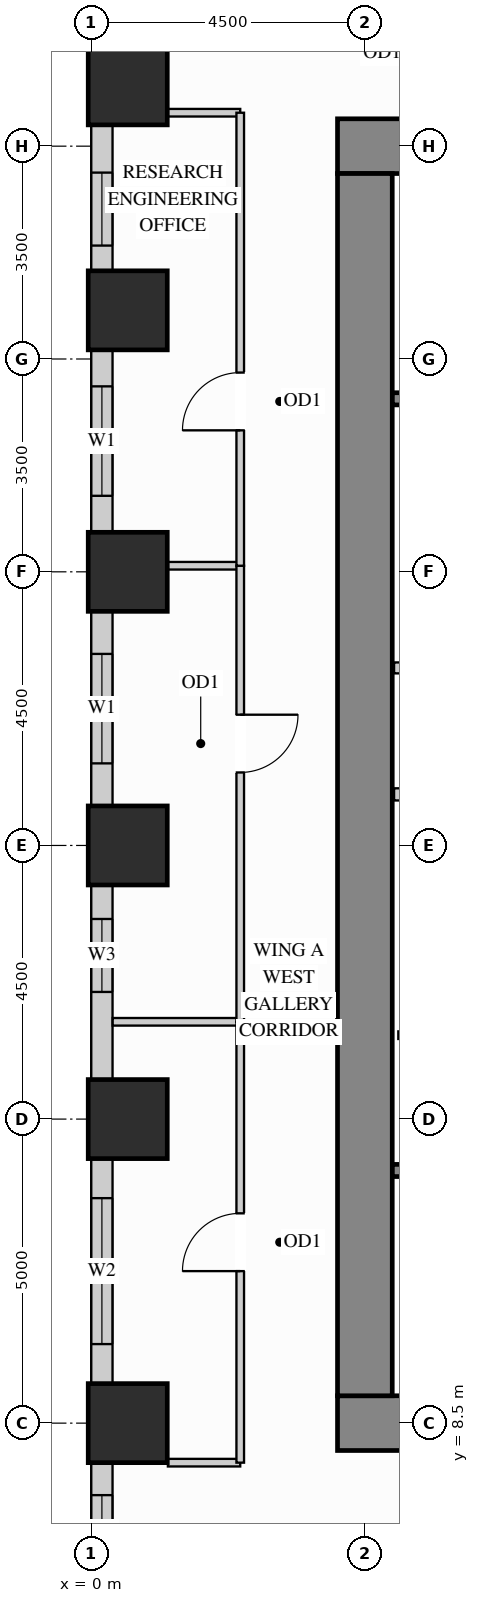
"""IFC4 building model, lengths in metres.
Left out: names, types, materials, properties, quantities, classifications, styles, units other than length and angle.
Written with IfcOpenShell. Run it as: python <this file> out.ifc"""

import sys

from ifc_helpers import new_model, si_unit, direction, frame, frame_2d, origin, origin_2d, place, context, subcontext, project, spatial, rectangle, extrude, source, transform, mapped, element, fill, save


model = new_model("IFC4")
c1 = context("Model", 3, precision=1e-05, world=origin(), true_north=direction((0.0, 1.0)))
c2 = subcontext(c1, "Body", "Model", "MODEL_VIEW")
j1 = project(units=[si_unit("LENGTHUNIT", "METRE"), si_unit("PLANEANGLEUNIT", "RADIAN")], contexts=[c1])
p1 = place(None, origin())
s1 = spatial("IfcSite", under=j1, at=p1, CompositionType="ELEMENT")
p2 = place(p1, origin())
s2 = spatial("IfcBuilding", under=s1, at=p2, CompositionType="ELEMENT")
p3 = place(p2, frame((0.0, 0.0, 36.9)))
s3 = spatial("IfcBuildingStorey", under=s2, at=p3, CompositionType="ELEMENT", Elevation=36.9)
m1 = source(origin(), c2, "Body", "SweptSolid", [
    extrude(rectangle(XDim=1.3, YDim=1.3, at=origin_2d()), origin(), (0.0, 0.0, 1.0), 3.38),
])
for number, where, z_axis, x_axis in (
    (1, (0.6, 13.5, 0.0), (0.0, 0.0, 1.0), (1.0, 0.0, 0.0)),
    (2, (0.6, 18.0, 0.0), (0.0, 0.0, 1.0), (1.0, 0.0, 0.0)),
    (3, (0.6, 22.5, 0.0), (0.0, 0.0, 1.0), (1.0, 0.0, 0.0)),
    (4, (0.6, 26.8, 0.0), (0.0, 0.0, 1.0), (1.0, 0.0, 0.0)),
    (5, (0.6, 30.5, 0.0), (0.0, 0.0, 1.0), (1.0, 0.0, 0.0)),
    (6, (0.6, 8.5, 0.0), (0.0, 0.0, 1.0), (1.0, 0.0, 0.0)),
):
    element("IfcColumn", number, at=place(p3, frame(where, z_axis=z_axis, x_axis=x_axis)), inside=s3, PredefinedType="COLUMN", context=c2, shape_type="MappedRepresentation", body=[
        mapped(m1, transform((0.0, 0.0, 0.0), x_axis=(1.0, 0.0, 0.0), y_axis=(0.0, 1.0, 0.0), z_axis=(0.0, 0.0, 1.0))),
    ])
m2 = source(origin(), c2, "Body", "SweptSolid", [
    extrude(rectangle(XDim=10.9, YDim=0.9, at=frame_2d((5.45, 0.0))), origin(), (0.0, 0.0, 1.0), 3.38),
])
for number, where, z_axis, x_axis in (
    (7, (4.05, 29.5, 0.0), (0.0, 0.0, 1.0), (1.0, 0.0, 0.0)),
    (8, (4.05, 8.5, 0.0), (0.0, 0.0, 1.0), (1.0, 0.0, 0.0)),
):
    element("IfcWall", number, at=place(p3, frame(where, z_axis=z_axis, x_axis=x_axis)), inside=s3, PredefinedType="SHEAR", context=c2, shape_type="MappedRepresentation", body=[
        mapped(m2, transform((0.0, 0.0, 0.0), x_axis=(1.0, 0.0, 0.0), y_axis=(0.0, 1.0, 0.0), z_axis=(0.0, 0.0, 1.0))),
    ])
m3 = source(origin(), c2, "Body", "SweptSolid", [
    extrude(rectangle(XDim=20.1, YDim=0.9, at=frame_2d((10.05, 0.0))), origin(), (0.0, 0.0, 1.0), 3.38),
])
p4 = place(p3, frame((4.5, 8.95, 0.0), z_axis=(0.0, 0.0, 1.0), x_axis=(0.0, 1.0, 0.0)))
e9 = element("IfcWall", 9, at=p4, inside=s3, PredefinedType="SHEAR", context=c2, shape_type="MappedRepresentation", body=[
    mapped(m3, transform((0.0, 0.0, 0.0), x_axis=(1.0, 0.0, 0.0), y_axis=(0.0, 1.0, 0.0), z_axis=(0.0, 0.0, 1.0))),
])
p5 = place(p3, frame((0.175, 29.852, 0.0), z_axis=(0.0, 0.0, 1.0), x_axis=(0.0, -1.0, 0.0)))
e10 = element("IfcWall", 10, at=p5, inside=s3, PredefinedType="SOLIDWALL", context=c2, shape_type="SweptSolid", body=[
    extrude(rectangle(XDim=2.404, YDim=0.35, at=frame_2d((1.202, 0.0))), origin(), (0.0, 0.0, 1.0), 2.51),
])
p6 = place(p5, frame((0.787, 0.0, 0.78)))
e11 = element("IfcOpeningElement", 11, at=p6, cuts=e10, PredefinedType="OPENING", context=c2, shape_type="SweptSolid", body=[
    extrude(rectangle(XDim=1.2, YDim=1.55, at=frame_2d((0.6, 0.775))), frame((0.0, 0.185, 0.0), z_axis=(0.0, -1.0, 0.0), x_axis=(1.0, 0.0, 0.0)), (0.0, 0.0, 1.0), 0.37),
])
p7 = place(p3, frame((0.175, 26.152, 0.0), z_axis=(0.0, 0.0, 1.0), x_axis=(0.0, -1.0, 0.0)))
e12 = element("IfcWall", 12, at=p7, inside=s3, PredefinedType="SOLIDWALL", context=c2, shape_type="SweptSolid", body=[
    extrude(rectangle(XDim=3.004, YDim=0.35, at=frame_2d((1.502, 0.0))), origin(), (0.0, 0.0, 1.0), 2.51),
])
p8 = place(p7, frame((0.602, 0.0, 0.78)))
e13 = element("IfcOpeningElement", 13, at=p8, cuts=e12, PredefinedType="OPENING", context=c2, shape_type="SweptSolid", body=[
    extrude(rectangle(XDim=1.8, YDim=1.55, at=frame_2d((0.9, 0.775))), frame((0.0, 0.185, 0.0), z_axis=(0.0, -1.0, 0.0), x_axis=(1.0, 0.0, 0.0)), (0.0, 0.0, 1.0), 0.37),
])
p9 = place(p3, frame((0.175, 21.852, 0.0), z_axis=(0.0, 0.0, 1.0), x_axis=(0.0, -1.0, 0.0)))
e14 = element("IfcWall", 14, at=p9, inside=s3, PredefinedType="SOLIDWALL", context=c2, shape_type="SweptSolid", body=[
    extrude(rectangle(XDim=3.204, YDim=0.35, at=frame_2d((1.602, 0.0))), origin(), (0.0, 0.0, 1.0), 2.51),
])
p10 = place(p9, frame((0.702, 0.0, 0.78)))
e15 = element("IfcOpeningElement", 15, at=p10, cuts=e14, PredefinedType="OPENING", context=c2, shape_type="SweptSolid", body=[
    extrude(rectangle(XDim=1.8, YDim=1.55, at=frame_2d((0.9, 0.775))), frame((0.0, 0.185, 0.0), z_axis=(0.0, -1.0, 0.0), x_axis=(1.0, 0.0, 0.0)), (0.0, 0.0, 1.0), 0.37),
])
p11 = place(p3, frame((0.175, 17.352, 0.0), z_axis=(0.0, 0.0, 1.0), x_axis=(0.0, -1.0, 0.0)))
e16 = element("IfcWall", 16, at=p11, inside=s3, PredefinedType="SOLIDWALL", context=c2, shape_type="SweptSolid", body=[
    extrude(rectangle(XDim=3.204, YDim=0.35, at=frame_2d((1.602, 0.0))), origin(), (0.0, 0.0, 1.0), 2.51),
])
p12 = place(p11, frame((0.561, 0.0, 0.78)))
e17 = element("IfcOpeningElement", 17, at=p12, cuts=e16, PredefinedType="OPENING", context=c2, shape_type="SweptSolid", body=[
    extrude(rectangle(XDim=1.2, YDim=1.55, at=frame_2d((0.6, 0.775))), frame((0.0, 0.185, 0.0), z_axis=(0.0, -1.0, 0.0), x_axis=(1.0, 0.0, 0.0)), (0.0, 0.0, 1.0), 0.37),
])
p13 = place(p3, frame((0.175, 12.852, 0.0), z_axis=(0.0, 0.0, 1.0), x_axis=(0.0, -1.0, 0.0)))
e18 = element("IfcWall", 18, at=p13, inside=s3, PredefinedType="SOLIDWALL", context=c2, shape_type="SweptSolid", body=[
    extrude(rectangle(XDim=3.704, YDim=0.35, at=frame_2d((1.852, 0.0))), origin(), (0.0, 0.0, 1.0), 2.51),
])
p14 = place(p13, frame((0.652, 0.0, 0.78)))
e19 = element("IfcOpeningElement", 19, at=p14, cuts=e18, PredefinedType="OPENING", context=c2, shape_type="SweptSolid", body=[
    extrude(rectangle(XDim=2.4, YDim=1.55, at=frame_2d((1.2, 0.775))), frame((0.0, 0.185, 0.0), z_axis=(0.0, -1.0, 0.0), x_axis=(1.0, 0.0, 0.0)), (0.0, 0.0, 1.0), 0.37),
])
p15 = place(p3, frame((0.175, 7.852, 0.0), z_axis=(0.0, 0.0, 1.0), x_axis=(0.0, -1.0, 0.0)))
e20 = element("IfcWall", 20, at=p15, inside=s3, PredefinedType="SOLIDWALL", context=c2, shape_type="SweptSolid", body=[
    extrude(rectangle(XDim=3.704, YDim=0.35, at=frame_2d((1.852, 0.0))), origin(), (0.0, 0.0, 1.0), 2.51),
])
p16 = place(p15, frame((0.536, 0.0, 0.78)))
e21 = element("IfcOpeningElement", 21, at=p16, cuts=e20, PredefinedType="OPENING", context=c2, shape_type="SweptSolid", body=[
    extrude(rectangle(XDim=1.2, YDim=1.55, at=frame_2d((0.6, 0.775))), frame((0.0, 0.185, 0.0), z_axis=(0.0, -1.0, 0.0), x_axis=(1.0, 0.0, 0.0)), (0.0, 0.0, 1.0), 0.37),
])
m4 = source(origin(), c2, "Body", "SweptSolid", [
    extrude(rectangle(XDim=2.17, YDim=0.18, at=frame_2d((1.085, 0.0))), origin(), (0.0, 0.0, 1.0), 3.365),
])
p17 = place(p3, frame((4.98, 20.92, 0.0), z_axis=(0.0, 0.0, 1.0), x_axis=(1.0, 0.0, 0.0)))
e22 = element("IfcWall", 22, at=p17, inside=s3, PredefinedType="PARTITIONING", context=c2, shape_type="MappedRepresentation", body=[
    mapped(m4, transform((0.0, 0.0, 0.0), x_axis=(1.0, 0.0, 0.0), y_axis=(0.0, 1.0, 0.0), z_axis=(0.0, 0.0, 1.0))),
])
p18 = place(p3, frame((5.05, 14.88, 0.0), z_axis=(0.0, 0.0, 1.0), x_axis=(1.0, 0.0, 0.0)))
e23 = element("IfcWall", 23, at=p18, inside=s3, PredefinedType="PARTITIONING", context=c2, shape_type="SweptSolid", body=[
    extrude(rectangle(XDim=2.35, YDim=0.125, at=frame_2d((1.175, 0.0))), origin(), (0.0, 0.0, 1.0), 3.365),
])
p19 = place(p18, frame((0.7, 0.0, 0.0)))
e24 = element("IfcOpeningElement", 24, at=p19, cuts=e23, PredefinedType="OPENING", context=c2, shape_type="SweptSolid", body=[
    extrude(rectangle(XDim=0.85, YDim=2.1, at=frame_2d((0.425, 1.05))), frame((0.0, 0.073, 0.0), z_axis=(0.0, -1.0, 0.0), x_axis=(1.0, 0.0, 0.0)), (0.0, 0.0, 1.0), 0.145),
])
m5 = source(origin(), c2, "Body", "SweptSolid", [
    extrude(rectangle(XDim=1.19, YDim=0.125, at=frame_2d((0.595, 0.0))), origin(), (0.0, 0.0, 1.0), 3.365),
])
for number, where, z_axis, x_axis in (
    (25, (1.26, 30.05, 0.0), (0.0, 0.0, 1.0), (1.0, 0.0, 0.0)),
    (26, (1.26, 7.85, 0.0), (0.0, 0.0, 1.0), (1.0, 0.0, 0.0)),
):
    element("IfcWall", number, at=place(p3, frame(where, z_axis=z_axis, x_axis=x_axis)), inside=s3, PredefinedType="PARTITIONING", context=c2, shape_type="MappedRepresentation", body=[
        mapped(m5, transform((0.0, 0.0, 0.0), x_axis=(1.0, 0.0, 0.0), y_axis=(0.0, 1.0, 0.0), z_axis=(0.0, 0.0, 1.0))),
    ])
m6 = source(origin(), c2, "Body", "SweptSolid", [
    extrude(rectangle(XDim=2.098, YDim=0.125, at=frame_2d((1.049, 0.0))), origin(), (0.0, 0.0, 1.0), 3.365),
])
p20 = place(p3, frame((0.352, 15.1, 0.0), z_axis=(0.0, 0.0, 1.0), x_axis=(1.0, 0.0, 0.0)))
e27 = element("IfcWall", 27, at=p20, inside=s3, PredefinedType="PARTITIONING", context=c2, shape_type="MappedRepresentation", body=[
    mapped(m6, transform((0.0, 0.0, 0.0), x_axis=(1.0, 0.0, 0.0), y_axis=(0.0, 1.0, 0.0), z_axis=(0.0, 0.0, 1.0))),
])
p21 = place(p3, frame((1.26, 22.6, 0.0), z_axis=(0.0, 0.0, 1.0), x_axis=(1.0, 0.0, 0.0)))
e28 = element("IfcWall", 28, at=p21, inside=s3, PredefinedType="PARTITIONING", context=c2, shape_type="MappedRepresentation", body=[
    mapped(m5, transform((0.0, 0.0, 0.0), x_axis=(1.0, 0.0, 0.0), y_axis=(0.0, 1.0, 0.0), z_axis=(0.0, 0.0, 1.0))),
])
p22 = place(p3, frame((2.45, 7.85, 0.0), z_axis=(0.0, 0.0, 1.0), x_axis=(0.0, 1.0, 0.0)))
e29 = element("IfcWall", 29, at=p22, inside=s3, PredefinedType="PARTITIONING", context=c2, shape_type="SweptSolid", body=[
    extrude(rectangle(XDim=7.25, YDim=0.125, at=frame_2d((3.625, 0.0))), origin(), (0.0, 0.0, 1.0), 3.365),
])
p23 = place(p22, frame((3.15, 0.0, 0.0)))
e30 = element("IfcOpeningElement", 30, at=p23, cuts=e29, PredefinedType="OPENING", context=c2, shape_type="SweptSolid", body=[
    extrude(rectangle(XDim=0.95, YDim=2.15, at=frame_2d((0.475, 1.075))), frame((0.0, 0.073, 0.0), z_axis=(0.0, -1.0, 0.0), x_axis=(1.0, 0.0, 0.0)), (0.0, 0.0, 1.0), 0.145),
])
p24 = place(p3, frame((2.45, 15.1, 0.0), z_axis=(0.0, 0.0, 1.0), x_axis=(0.0, 1.0, 0.0)))
e31 = element("IfcWall", 31, at=p24, inside=s3, PredefinedType="PARTITIONING", context=c2, shape_type="SweptSolid", body=[
    extrude(rectangle(XDim=7.5, YDim=0.125, at=frame_2d((3.75, 0.0))), origin(), (0.0, 0.0, 1.0), 3.365),
])
p25 = place(p24, frame((4.1, 0.0, 0.0)))
e32 = element("IfcOpeningElement", 32, at=p25, cuts=e31, PredefinedType="OPENING", context=c2, shape_type="SweptSolid", body=[
    extrude(rectangle(XDim=0.95, YDim=2.15, at=frame_2d((0.475, 1.075))), frame((0.0, 0.073, 0.0), z_axis=(0.0, -1.0, 0.0), x_axis=(1.0, 0.0, 0.0)), (0.0, 0.0, 1.0), 0.145),
])
p26 = place(p3, frame((2.45, 22.6, 0.0), z_axis=(0.0, 0.0, 1.0), x_axis=(0.0, 1.0, 0.0)))
e33 = element("IfcWall", 33, at=p26, inside=s3, PredefinedType="PARTITIONING", context=c2, shape_type="SweptSolid", body=[
    extrude(rectangle(XDim=7.45, YDim=0.125, at=frame_2d((3.725, 0.0))), origin(), (0.0, 0.0, 1.0), 3.365),
])
p27 = place(p26, frame((2.227, 0.0, 0.0)))
e34 = element("IfcOpeningElement", 34, at=p27, cuts=e33, PredefinedType="OPENING", context=c2, shape_type="SweptSolid", body=[
    extrude(rectangle(XDim=0.95, YDim=2.15, at=frame_2d((0.475, 1.075))), frame((0.0, 0.073, 0.0), z_axis=(0.0, -1.0, 0.0), x_axis=(1.0, 0.0, 0.0)), (0.0, 0.0, 1.0), 0.145),
])
m7 = source(origin(), c2, "Body", "SweptSolid", [
    extrude(rectangle(XDim=2.09, YDim=0.2, at=frame_2d((1.045, 0.0))), origin(), (0.0, 0.0, 1.0), 3.365),
])
p28 = place(p3, frame((4.98, 18.84, 0.0), z_axis=(0.0, 0.0, 1.0), x_axis=(1.0, 0.0, 0.0)))
e35 = element("IfcWall", 35, at=p28, inside=s3, PredefinedType="PARTITIONING", context=c2, shape_type="MappedRepresentation", body=[
    mapped(m7, transform((0.0, 0.0, 0.0), x_axis=(1.0, 0.0, 0.0), y_axis=(0.0, 1.0, 0.0), z_axis=(0.0, 0.0, 1.0))),
])
p29 = place(p3, frame((4.952, 12.655, 0.0), z_axis=(0.0, 0.0, 1.0), x_axis=(1.0, 0.0, 0.0)))
e36 = element("IfcWall", 36, at=p29, inside=s3, PredefinedType="SHEAR", context=c2, shape_type="SweptSolid", body=[
    extrude(rectangle(XDim=7.453, YDim=0.2, at=frame_2d((3.727, 0.0))), origin(), (0.0, 0.0, 1.0), 3.38),
])
p30 = place(p29, frame((0.4, 0.0, 0.0)))
e37 = element("IfcOpeningElement", 37, at=p30, cuts=e36, PredefinedType="OPENING", context=c2, shape_type="SweptSolid", body=[
    extrude(rectangle(XDim=1.1, YDim=2.15, at=frame_2d((0.55, 1.075))), frame((0.0, 0.11, 0.0), z_axis=(0.0, -1.0, 0.0), x_axis=(1.0, 0.0, 0.0)), (0.0, 0.0, 1.0), 0.22),
])
p31 = place(p3, frame((4.952, 25.345, 0.0), z_axis=(0.0, 0.0, 1.0), x_axis=(1.0, 0.0, 0.0)))
e38 = element("IfcWall", 38, at=p31, inside=s3, PredefinedType="SHEAR", context=c2, shape_type="SweptSolid", body=[
    extrude(rectangle(XDim=7.453, YDim=0.2, at=frame_2d((3.727, 0.0))), origin(), (0.0, 0.0, 1.0), 3.38),
])
p32 = place(p31, frame((0.4, 0.0, 0.0)))
e39 = element("IfcOpeningElement", 39, at=p32, cuts=e38, PredefinedType="OPENING", context=c2, shape_type="SweptSolid", body=[
    extrude(rectangle(XDim=1.1, YDim=2.15, at=frame_2d((0.55, 1.075))), frame((0.0, 0.11, 0.0), z_axis=(0.0, -1.0, 0.0), x_axis=(1.0, 0.0, 0.0)), (0.0, 0.0, 1.0), 0.22),
])
m8 = source(origin(), c2, "Body", "SweptSolid", [
    extrude(rectangle(XDim=0.95, YDim=2.15, at=frame_2d((0.475, 1.075))), frame((0.0, 0.025, 0.0), z_axis=(0.0, -1.0, 0.0), x_axis=(1.0, 0.0, 0.0)), (0.0, 0.0, 1.0), 0.05),
])
p33 = place(p23, origin())
e40 = element("IfcDoor", 40, at=p33, inside=s3, OperationType="SINGLE_SWING_LEFT", PredefinedType="DOOR", context=c2, shape_type="MappedRepresentation", body=[
    mapped(m8, transform((0.0, 0.0, 0.0), x_axis=(1.0, 0.0, 0.0), y_axis=(0.0, 1.0, 0.0), z_axis=(0.0, 0.0, 1.0))),
])
fill(e30, e40)
p34 = place(p25, origin())
e41 = element("IfcDoor", 41, at=p34, inside=s3, OperationType="SINGLE_SWING_RIGHT", PredefinedType="DOOR", context=c2, shape_type="MappedRepresentation", body=[
    mapped(m8, transform((0.0, 0.0, 0.0), x_axis=(1.0, 0.0, 0.0), y_axis=(0.0, 1.0, 0.0), z_axis=(0.0, 0.0, 1.0))),
])
fill(e32, e41)
p35 = place(p27, origin())
e42 = element("IfcDoor", 42, at=p35, inside=s3, OperationType="SINGLE_SWING_LEFT", PredefinedType="DOOR", context=c2, shape_type="MappedRepresentation", body=[
    mapped(m8, transform((0.0, 0.0, 0.0), x_axis=(1.0, 0.0, 0.0), y_axis=(0.0, 1.0, 0.0), z_axis=(0.0, 0.0, 1.0))),
])
fill(e34, e42)
m9 = source(origin(), c2, "Body", "SweptSolid", [
    extrude(rectangle(XDim=1.8, YDim=1.55, at=frame_2d((0.9, 0.775))), frame((0.0, 0.03, 0.0), z_axis=(0.0, -1.0, 0.0), x_axis=(1.0, 0.0, 0.0)), (0.0, 0.0, 1.0), 0.06),
])
p36 = place(p8, origin())
e43 = element("IfcWindow", 43, at=p36, inside=s3, PartitioningType="SINGLE_PANEL", PredefinedType="WINDOW", context=c2, shape_type="MappedRepresentation", body=[
    mapped(m9, transform((0.0, 0.0, 0.0), x_axis=(1.0, 0.0, 0.0), y_axis=(0.0, 1.0, 0.0), z_axis=(0.0, 0.0, 1.0))),
])
fill(e13, e43)
p37 = place(p10, origin())
e44 = element("IfcWindow", 44, at=p37, inside=s3, PartitioningType="SINGLE_PANEL", PredefinedType="WINDOW", context=c2, shape_type="MappedRepresentation", body=[
    mapped(m9, transform((0.0, 0.0, 0.0), x_axis=(1.0, 0.0, 0.0), y_axis=(0.0, 1.0, 0.0), z_axis=(0.0, 0.0, 1.0))),
])
fill(e15, e44)
m10 = source(origin(), c2, "Body", "SweptSolid", [
    extrude(rectangle(XDim=2.4, YDim=1.55, at=frame_2d((1.2, 0.775))), frame((0.0, 0.03, 0.0), z_axis=(0.0, -1.0, 0.0), x_axis=(1.0, 0.0, 0.0)), (0.0, 0.0, 1.0), 0.06),
])
p38 = place(p14, origin())
e45 = element("IfcWindow", 45, at=p38, inside=s3, PartitioningType="SINGLE_PANEL", PredefinedType="WINDOW", context=c2, shape_type="MappedRepresentation", body=[
    mapped(m10, transform((0.0, 0.0, 0.0), x_axis=(1.0, 0.0, 0.0), y_axis=(0.0, 1.0, 0.0), z_axis=(0.0, 0.0, 1.0))),
])
fill(e19, e45)
m11 = source(origin(), c2, "Body", "SweptSolid", [
    extrude(rectangle(XDim=1.2, YDim=1.55, at=frame_2d((0.6, 0.775))), frame((0.0, 0.03, 0.0), z_axis=(0.0, -1.0, 0.0), x_axis=(1.0, 0.0, 0.0)), (0.0, 0.0, 1.0), 0.06),
])
p39 = place(p6, origin())
e46 = element("IfcWindow", 46, at=p39, inside=s3, PartitioningType="SINGLE_PANEL", PredefinedType="WINDOW", context=c2, shape_type="MappedRepresentation", body=[
    mapped(m11, transform((0.0, 0.0, 0.0), x_axis=(1.0, 0.0, 0.0), y_axis=(0.0, 1.0, 0.0), z_axis=(0.0, 0.0, 1.0))),
])
fill(e11, e46)
p40 = place(p12, origin())
e47 = element("IfcWindow", 47, at=p40, inside=s3, PartitioningType="SINGLE_PANEL", PredefinedType="WINDOW", context=c2, shape_type="MappedRepresentation", body=[
    mapped(m11, transform((0.0, 0.0, 0.0), x_axis=(1.0, 0.0, 0.0), y_axis=(0.0, 1.0, 0.0), z_axis=(0.0, 0.0, 1.0))),
])
fill(e17, e47)
p41 = place(p16, origin())
e48 = element("IfcWindow", 48, at=p41, inside=s3, PartitioningType="SINGLE_PANEL", PredefinedType="WINDOW", context=c2, shape_type="MappedRepresentation", body=[
    mapped(m11, transform((0.0, 0.0, 0.0), x_axis=(1.0, 0.0, 0.0), y_axis=(0.0, 1.0, 0.0), z_axis=(0.0, 0.0, 1.0))),
])
fill(e21, e48)
save(model, sys.argv[1])
